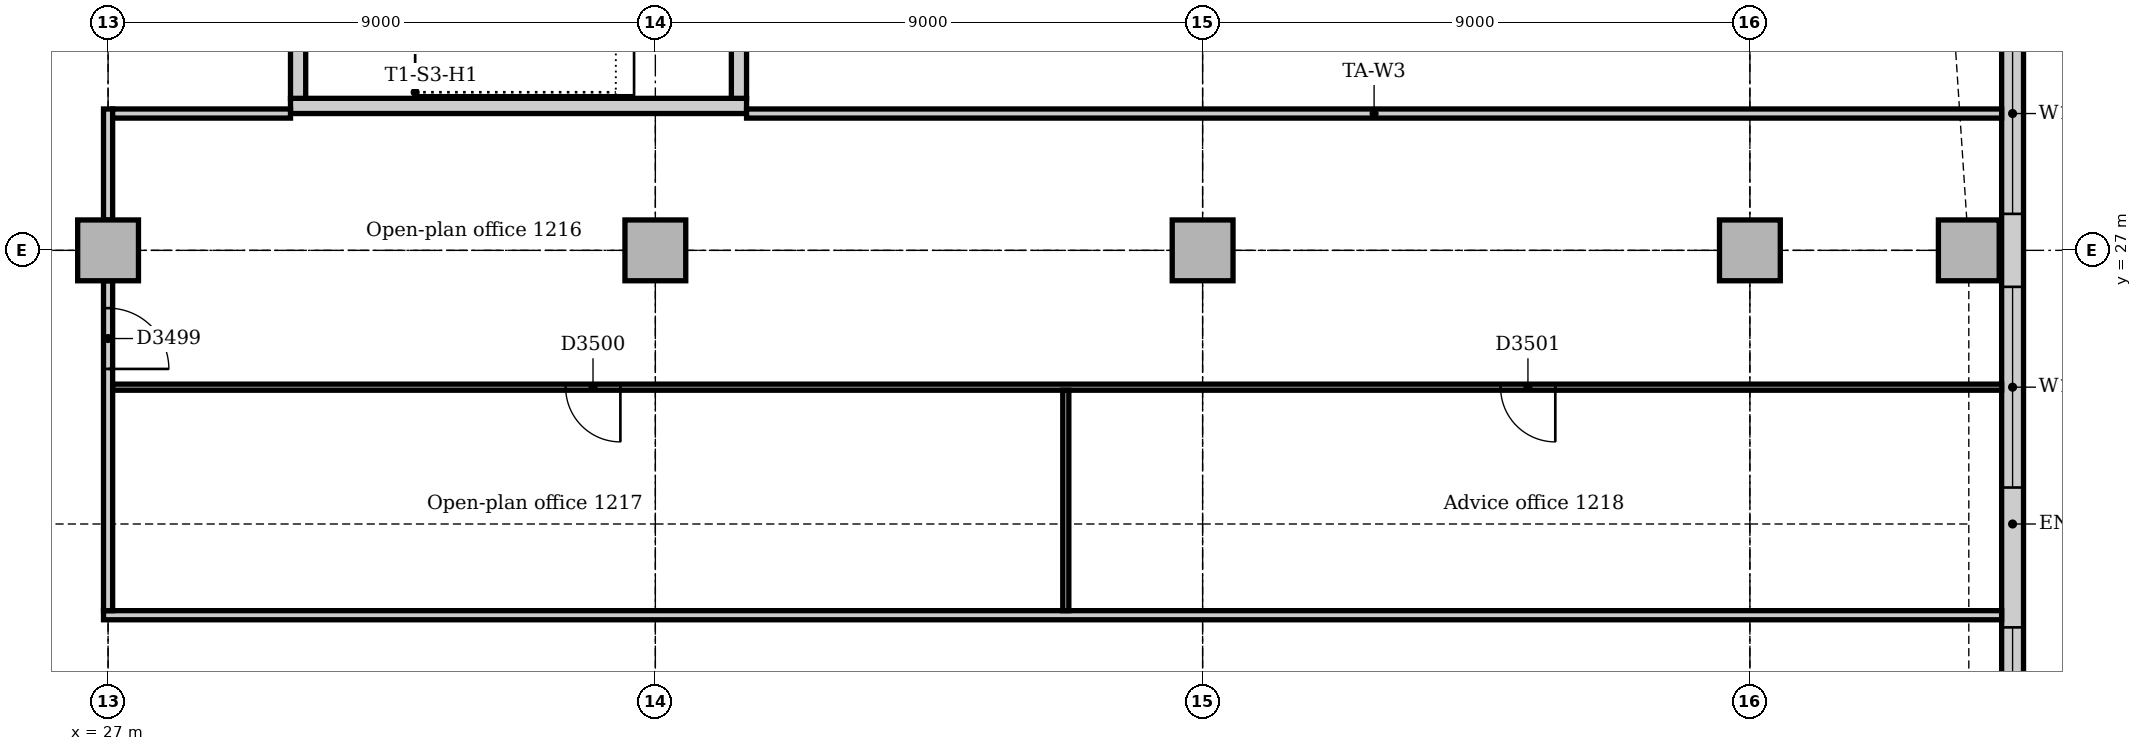
"""IFC4 building model, lengths in metres.
Left out: names, types, materials, properties, quantities, classifications, styles, units other than length and angle.
Written with IfcOpenShell. Run it as: python <this file> out.ifc"""

import sys

from ifc_helpers import new_model, si_unit, direction, frame, frame_2d, origin, origin_2d, place, context, subcontext, project, spatial, rectangle, extrude, element, fill, save


model = new_model("IFC4")
c1 = context("Model", 3, precision=1e-05, world=origin(), true_north=direction((0.0, 1.0)))
c2 = subcontext(c1, "Body", "Model", "MODEL_VIEW")
j1 = project(units=[si_unit("LENGTHUNIT", "METRE"), si_unit("PLANEANGLEUNIT", "RADIAN")], contexts=[c1])
p1 = place(None, origin())
s1 = spatial("IfcSite", under=j1, at=p1, CompositionType="ELEMENT")
p2 = place(p1, origin())
s2 = spatial("IfcBuilding", under=s1, at=p2, CompositionType="ELEMENT")
p3 = place(p2, frame((0.0, 0.0, 55.0)))
s3 = spatial("IfcBuildingStorey", under=s2, at=p3, CompositionType="ELEMENT", Elevation=55.0)
p4 = place(p3, frame((30.0, 29.375, 0.0), z_axis=(0.0, 0.0, 1.0), x_axis=(1.0, 0.0, 0.0)))
e1 = element("IfcWall", 1, at=p4, inside=s3, PredefinedType="SOLIDWALL", context=c2, shape_type="SweptSolid", body=[
    extrude(rectangle(XDim=7.5, YDim=0.25, at=frame_2d((3.75, 0.0))), origin(), (0.0, 0.0, 1.0), 4.0),
])
p5 = place(p3, frame((37.375, 29.5, 0.0), z_axis=(0.0, 0.0, 1.0), x_axis=(0.0, 1.0, 0.0)))
e2 = element("IfcWall", 2, at=p5, inside=s3, PredefinedType="SOLIDWALL", context=c2, shape_type="SweptSolid", body=[
    extrude(rectangle(XDim=4.0, YDim=0.25, at=frame_2d((2.0, 0.0))), origin(), (0.0, 0.0, 1.0), 4.0),
])
p6 = place(p3, frame((30.125, 33.5, 0.0), z_axis=(0.0, 0.0, 1.0), x_axis=(0.0, -1.0, 0.0)))
e3 = element("IfcWall", 3, at=p6, inside=s3, PredefinedType="SOLIDWALL", context=c2, shape_type="SweptSolid", body=[
    extrude(rectangle(XDim=4.0, YDim=0.25, at=frame_2d((2.0, 0.0))), origin(), (0.0, 0.0, 1.0), 4.0),
])
p7 = place(p6, frame((1.5, 0.0, 0.0)))
e4 = element("IfcOpeningElement", 4, at=p7, cuts=e3, PredefinedType="OPENING", context=c2, shape_type="SweptSolid", body=[
    extrude(rectangle(XDim=1.0, YDim=2.1, at=frame_2d((0.5, 1.05))), frame((0.0, 0.135, 0.0), z_axis=(0.0, -1.0, 0.0), x_axis=(1.0, 0.0, 0.0)), (0.0, 0.0, 1.0), 0.27),
])
for number, where, z_axis, x_axis in (
    (5, (57.6, 27.0, 0.0), (0.0, 0.0, 1.0), (1.0, 0.0, 0.0)),
    (6, (27.0, 27.0, 0.0), (0.0, 0.0, 1.0), (1.0, 0.0, 0.0)),
    (7, (36.0, 27.0, 0.0), (0.0, 0.0, 1.0), (1.0, 0.0, 0.0)),
    (8, (45.0, 27.0, 0.0), (0.0, 0.0, 1.0), (1.0, 0.0, 0.0)),
    (9, (54.0, 27.0, 0.0), (0.0, 0.0, 1.0), (1.0, 0.0, 0.0)),
):
    element("IfcColumn", number, at=place(p3, frame(where, z_axis=z_axis, x_axis=x_axis)), inside=s3, PredefinedType="COLUMN", context=c2, shape_type="SweptSolid", body=[
        extrude(rectangle(XDim=1.0, YDim=1.0, at=origin_2d()), origin(), (0.0, 0.0, 1.0), 3.85),
    ])
p8 = place(p3, frame((58.32, 10.243, 0.0), z_axis=(0.0, 0.0, 1.0), x_axis=(0.0, 1.0, 0.0)))
e10 = element("IfcWall", 10, at=p8, inside=s3, PredefinedType="STANDARD", context=c2, shape_type="SweptSolid", body=[
    extrude(rectangle(XDim=24.515, YDim=0.36, at=frame_2d((12.257, 0.0))), origin(), (0.0, 0.0, 1.0), 3.85),
])
p9 = place(p8, frame((3.857, 0.0, 0.9)))
e11 = element("IfcOpeningElement", 11, at=p9, cuts=e10, PredefinedType="OPENING", context=c2, shape_type="SweptSolid", body=[
    extrude(rectangle(XDim=3.3, YDim=1.6, at=frame_2d((1.65, 0.8))), frame((0.0, 0.19, 0.0), z_axis=(0.0, -1.0, 0.0), x_axis=(1.0, 0.0, 0.0)), (0.0, 0.0, 1.0), 0.38),
])
p10 = place(p8, frame((8.757, 0.0, 0.9)))
e12 = element("IfcOpeningElement", 12, at=p10, cuts=e10, PredefinedType="OPENING", context=c2, shape_type="SweptSolid", body=[
    extrude(rectangle(XDim=1.8, YDim=1.6, at=frame_2d((0.9, 0.8))), frame((0.0, 0.19, 0.0), z_axis=(0.0, -1.0, 0.0), x_axis=(1.0, 0.0, 0.0)), (0.0, 0.0, 1.0), 0.38),
])
p11 = place(p8, frame((12.857, 0.0, 0.9)))
e13 = element("IfcOpeningElement", 13, at=p11, cuts=e10, PredefinedType="OPENING", context=c2, shape_type="SweptSolid", body=[
    extrude(rectangle(XDim=3.3, YDim=1.6, at=frame_2d((1.65, 0.8))), frame((0.0, 0.19, 0.0), z_axis=(0.0, -1.0, 0.0), x_axis=(1.0, 0.0, 0.0)), (0.0, 0.0, 1.0), 0.38),
])
p12 = place(p8, frame((17.357, 0.0, 0.9)))
e14 = element("IfcOpeningElement", 14, at=p12, cuts=e10, PredefinedType="OPENING", context=c2, shape_type="SweptSolid", body=[
    extrude(rectangle(XDim=3.3, YDim=1.6, at=frame_2d((1.65, 0.8))), frame((0.0, 0.19, 0.0), z_axis=(0.0, -1.0, 0.0), x_axis=(1.0, 0.0, 0.0)), (0.0, 0.0, 1.0), 0.38),
])
p13 = place(p3, frame((26.925, 21.0, 0.0), z_axis=(0.0, 0.0, 1.0), x_axis=(1.0, 0.0, 0.0)))
e15 = element("IfcWall", 15, at=p13, inside=s3, PredefinedType="PARTITIONING", context=c2, shape_type="SweptSolid", body=[
    extrude(rectangle(XDim=31.215, YDim=0.15, at=frame_2d((15.607, 0.0))), origin(), (0.0, 0.0, 1.0), 3.85),
])
p14 = place(p3, frame((27.0, 21.075, 0.0), z_axis=(0.0, 0.0, 1.0), x_axis=(0.0, 1.0, 0.0)))
e16 = element("IfcWall", 16, at=p14, inside=s3, PredefinedType="PARTITIONING", context=c2, shape_type="SweptSolid", body=[
    extrude(rectangle(XDim=5.425, YDim=0.15, at=frame_2d((2.712, 0.0))), origin(), (0.0, 0.0, 1.0), 3.158),
])
p15 = place(p14, frame((3.975, 0.0, 0.0)))
e17 = element("IfcOpeningElement", 17, at=p15, cuts=e16, PredefinedType="OPENING", context=c2, shape_type="SweptSolid", body=[
    extrude(rectangle(XDim=1.0, YDim=2.1, at=frame_2d((0.5, 1.05))), frame((0.0, 0.085, 0.0), z_axis=(0.0, -1.0, 0.0), x_axis=(1.0, 0.0, 0.0)), (0.0, 0.0, 1.0), 0.17),
])
p16 = place(p3, frame((27.0, 27.5, 0.0), z_axis=(0.0, 0.0, 1.0), x_axis=(0.0, 1.0, 0.0)))
e18 = element("IfcWall", 18, at=p16, inside=s3, PredefinedType="PARTITIONING", context=c2, shape_type="SweptSolid", body=[
    extrude(rectangle(XDim=1.825, YDim=0.15, at=frame_2d((0.912, 0.0))), origin(), (0.0, 0.0, 1.0), 3.158),
])
p17 = place(p3, frame((27.075, 29.25, 0.0), z_axis=(0.0, 0.0, 1.0), x_axis=(1.0, 0.0, 0.0)))
e19 = element("IfcWall", 19, at=p17, inside=s3, PredefinedType="PARTITIONING", context=c2, shape_type="SweptSolid", body=[
    extrude(rectangle(XDim=2.925, YDim=0.15, at=frame_2d((1.462, 0.0))), origin(), (0.0, 0.0, 1.0), 3.85),
])
p18 = place(p3, frame((37.5, 29.25, 0.0), z_axis=(0.0, 0.0, 1.0), x_axis=(1.0, 0.0, 0.0)))
e20 = element("IfcWall", 20, at=p18, inside=s3, PredefinedType="PARTITIONING", context=c2, shape_type="SweptSolid", body=[
    extrude(rectangle(XDim=20.64, YDim=0.15, at=frame_2d((10.32, 0.0))), origin(), (0.0, 0.0, 1.0), 3.85),
])
p19 = place(p3, frame((27.075, 24.75, 0.0), z_axis=(0.0, 0.0, 1.0), x_axis=(1.0, 0.0, 0.0)))
e21 = element("IfcWall", 21, at=p19, inside=s3, PredefinedType="PARTITIONING", context=c2, shape_type="SweptSolid", body=[
    extrude(rectangle(XDim=31.065, YDim=0.1, at=frame_2d((15.533, 0.0))), origin(), (0.0, 0.0, 1.0), 3.85),
])
p20 = place(p19, frame((7.45, 0.0, 0.0)))
e22 = element("IfcOpeningElement", 22, at=p20, cuts=e21, PredefinedType="OPENING", context=c2, shape_type="SweptSolid", body=[
    extrude(rectangle(XDim=0.9, YDim=2.1, at=frame_2d((0.45, 1.05))), frame((0.0, 0.06, 0.0), z_axis=(0.0, -1.0, 0.0), x_axis=(1.0, 0.0, 0.0)), (0.0, 0.0, 1.0), 0.12),
])
p21 = place(p19, frame((22.825, 0.0, 0.0)))
e23 = element("IfcOpeningElement", 23, at=p21, cuts=e21, PredefinedType="OPENING", context=c2, shape_type="SweptSolid", body=[
    extrude(rectangle(XDim=0.9, YDim=2.1, at=frame_2d((0.45, 1.05))), frame((0.0, 0.06, 0.0), z_axis=(0.0, -1.0, 0.0), x_axis=(1.0, 0.0, 0.0)), (0.0, 0.0, 1.0), 0.12),
])
p22 = place(p3, frame((42.75, 21.075, 0.0), z_axis=(0.0, 0.0, 1.0), x_axis=(0.0, 1.0, 0.0)))
e24 = element("IfcWall", 24, at=p22, inside=s3, PredefinedType="PARTITIONING", context=c2, shape_type="SweptSolid", body=[
    extrude(rectangle(XDim=3.625, YDim=0.1, at=frame_2d((1.812, 0.0))), origin(), (0.0, 0.0, 1.0), 3.85),
])
p23 = place(p10, origin())
e25 = element("IfcWindow", 25, at=p23, inside=s3, PartitioningType="SINGLE_PANEL", PredefinedType="WINDOW", context=c2, shape_type="SweptSolid", body=[
    extrude(rectangle(XDim=1.8, YDim=1.6, at=frame_2d((0.9, 0.8))), frame((0.0, 0.13, 0.0), z_axis=(0.0, -1.0, 0.0), x_axis=(1.0, 0.0, 0.0)), (0.0, 0.0, 1.0), 0.06),
])
fill(e12, e25)
p24 = place(p11, origin())
e26 = element("IfcWindow", 26, at=p24, inside=s3, PartitioningType="SINGLE_PANEL", PredefinedType="WINDOW", context=c2, shape_type="SweptSolid", body=[
    extrude(rectangle(XDim=3.3, YDim=1.6, at=frame_2d((1.65, 0.8))), frame((0.0, 0.13, 0.0), z_axis=(0.0, -1.0, 0.0), x_axis=(1.0, 0.0, 0.0)), (0.0, 0.0, 1.0), 0.06),
])
fill(e13, e26)
p25 = place(p12, origin())
e27 = element("IfcWindow", 27, at=p25, inside=s3, PartitioningType="SINGLE_PANEL", PredefinedType="WINDOW", context=c2, shape_type="SweptSolid", body=[
    extrude(rectangle(XDim=3.3, YDim=1.6, at=frame_2d((1.65, 0.8))), frame((0.0, 0.13, 0.0), z_axis=(0.0, -1.0, 0.0), x_axis=(1.0, 0.0, 0.0)), (0.0, 0.0, 1.0), 0.06),
])
fill(e14, e27)
p26 = place(p15, frame((1.0, 0.0, 0.0), z_axis=(0.0, 0.0, 1.0), x_axis=(-1.0, 0.0, 0.0)))
e28 = element("IfcDoor", 28, at=p26, inside=s3, OperationType="SINGLE_SWING_RIGHT", PredefinedType="DOOR", context=c2, shape_type="SweptSolid", body=[
    extrude(rectangle(XDim=1.0, YDim=2.1, at=frame_2d((0.5, 1.05))), frame((0.0, 0.025, 0.0), z_axis=(0.0, -1.0, 0.0), x_axis=(1.0, 0.0, 0.0)), (0.0, 0.0, 1.0), 0.05),
])
fill(e17, e28)
p27 = place(p20, frame((0.9, 0.0, 0.0), z_axis=(0.0, 0.0, 1.0), x_axis=(-1.0, 0.0, 0.0)))
e29 = element("IfcDoor", 29, at=p27, inside=s3, OperationType="SINGLE_SWING_LEFT", PredefinedType="DOOR", context=c2, shape_type="SweptSolid", body=[
    extrude(rectangle(XDim=0.9, YDim=2.1, at=frame_2d((0.45, 1.05))), frame((0.0, 0.025, 0.0), z_axis=(0.0, -1.0, 0.0), x_axis=(1.0, 0.0, 0.0)), (0.0, 0.0, 1.0), 0.05),
])
fill(e22, e29)
p28 = place(p21, frame((0.9, 0.0, 0.0), z_axis=(0.0, 0.0, 1.0), x_axis=(-1.0, 0.0, 0.0)))
e30 = element("IfcDoor", 30, at=p28, inside=s3, OperationType="SINGLE_SWING_LEFT", PredefinedType="DOOR", context=c2, shape_type="SweptSolid", body=[
    extrude(rectangle(XDim=0.9, YDim=2.1, at=frame_2d((0.45, 1.05))), frame((0.0, 0.025, 0.0), z_axis=(0.0, -1.0, 0.0), x_axis=(1.0, 0.0, 0.0)), (0.0, 0.0, 1.0), 0.05),
])
fill(e23, e30)
save(model, sys.argv[1])
